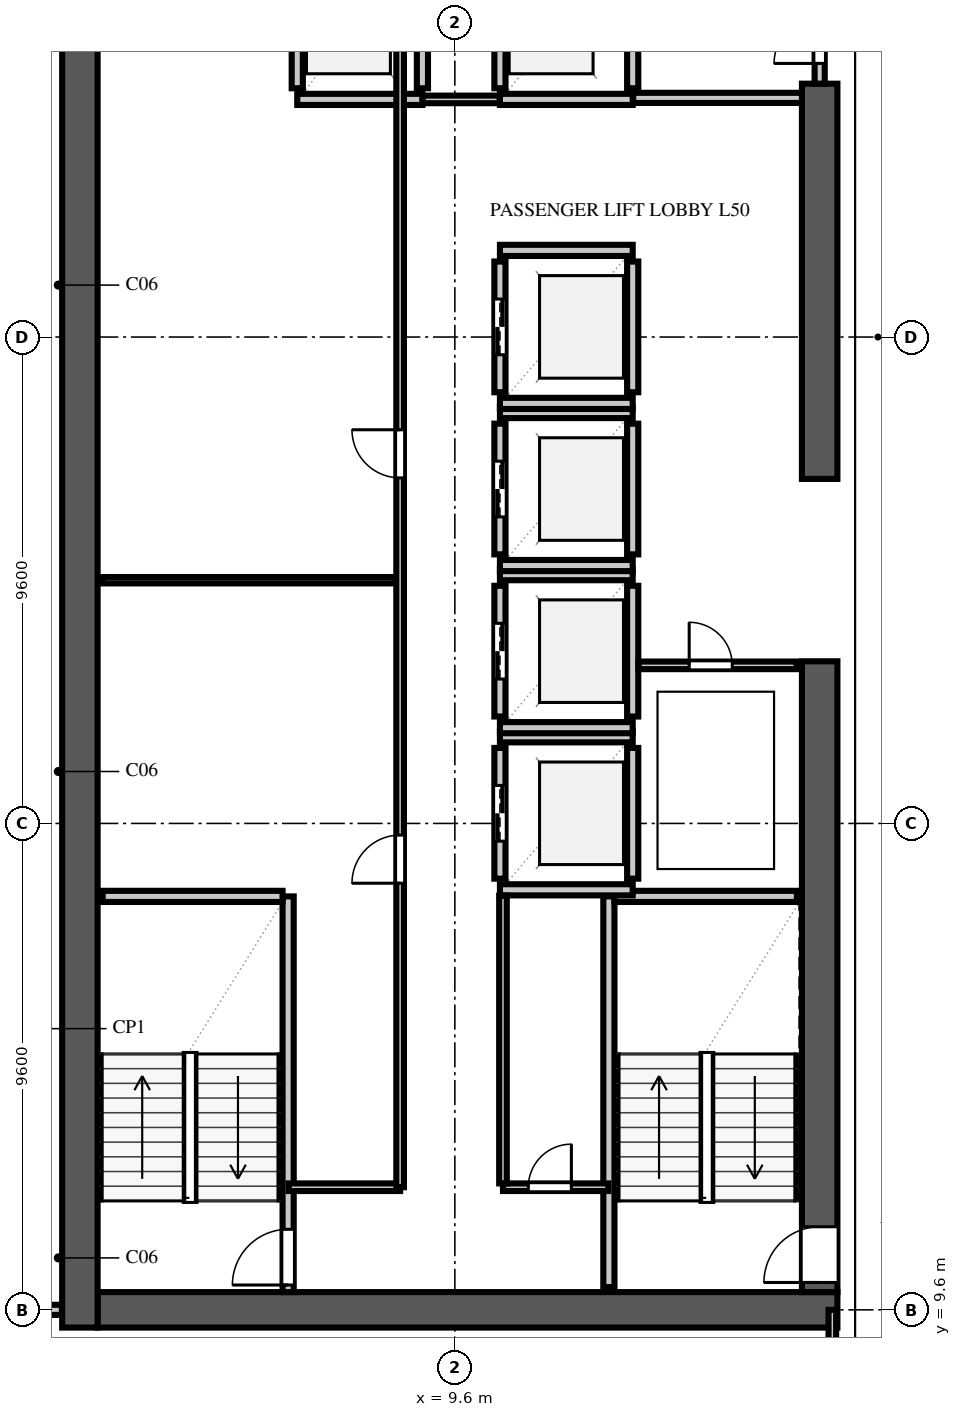
"""IFC4 building model, lengths in metres.
Left out: names, types, materials, properties, quantities, classifications, styles, units other than length and angle.
Written with IfcOpenShell. Run it as: python <this file> out.ifc"""

import sys

from ifc_helpers import new_model, si_unit, direction, frame, frame_2d, origin, place, context, subcontext, project, spatial, rectangle, extrude, element, fill, save


model = new_model("IFC4")
c1 = context("Model", 3, precision=1e-05, world=origin(), true_north=direction((0.0, 1.0)))
c2 = subcontext(c1, "Body", "Model", "MODEL_VIEW")
j1 = project(units=[si_unit("LENGTHUNIT", "METRE"), si_unit("PLANEANGLEUNIT", "RADIAN")], contexts=[c1])
p1 = place(None, origin())
s1 = spatial("IfcSite", under=j1, at=p1, CompositionType="ELEMENT")
p2 = place(p1, origin())
s2 = spatial("IfcBuilding", under=s1, at=p2, CompositionType="ELEMENT")
p3 = place(p2, frame((0.0, 0.0, 199.0)))
s3 = spatial("IfcBuildingStorey", under=s2, at=p3, CompositionType="ELEMENT", Elevation=199.0)
p4 = place(p3, frame((2.55, 9.6, 0.0), z_axis=(0.0, 0.0, 1.0), x_axis=(1.0, 0.0, 0.0)))
e1 = element("IfcWall", 1, at=p4, inside=s3, PredefinedType="SHEAR", context=c2, shape_type="SweptSolid", body=[
    extrude(rectangle(XDim=14.6, YDim=0.7, at=frame_2d((7.3, 0.0))), origin(), (0.0, 0.0, 1.0), 3.54),
])
p5 = place(p3, frame((2.2, 9.25, 0.0), z_axis=(0.0, 0.0, 1.0), x_axis=(0.0, 1.0, 0.0)))
e2 = element("IfcWall", 2, at=p5, inside=s3, PredefinedType="SHEAR", context=c2, shape_type="SweptSolid", body=[
    extrude(rectangle(XDim=39.1, YDim=0.7, at=frame_2d((19.55, 0.0))), origin(), (0.0, 0.0, 1.0), 3.54),
])
p6 = place(p3, frame((16.8, 9.95, 0.0), z_axis=(0.0, 0.0, 1.0), x_axis=(0.0, 1.0, 0.0)))
e3 = element("IfcWall", 3, at=p6, inside=s3, PredefinedType="SHEAR", context=c2, shape_type="SweptSolid", body=[
    extrude(rectangle(XDim=12.45, YDim=0.7, at=frame_2d((6.225, 0.0))), origin(), (0.0, 0.0, 1.0), 3.54),
])
p7 = place(p6, frame((0.19, 0.0, 0.0)))
e4 = element("IfcOpeningElement", 4, at=p7, cuts=e3, PredefinedType="OPENING", context=c2, shape_type="SweptSolid", body=[
    extrude(rectangle(XDim=1.1, YDim=2.2, at=frame_2d((0.55, 1.1))), frame((0.0, 0.362, 0.0), z_axis=(0.0, -1.0, 0.0), x_axis=(1.0, 0.0, 0.0)), (0.0, 0.0, 1.0), 0.724),
])
p8 = place(p3, frame((16.8, 26.0, 0.0), z_axis=(0.0, 0.0, 1.0), x_axis=(0.0, 1.0, 0.0)))
e5 = element("IfcWall", 5, at=p8, inside=s3, PredefinedType="SHEAR", context=c2, shape_type="SweptSolid", body=[
    extrude(rectangle(XDim=7.8, YDim=0.7, at=frame_2d((3.9, 0.0))), origin(), (0.0, 0.0, 1.0), 3.54),
])
p9 = place(p3, frame((6.31, 9.95, 0.0), z_axis=(0.0, 0.0, 1.0), x_axis=(0.0, 1.0, 0.0)))
e6 = element("IfcWall", 6, at=p9, inside=s3, PredefinedType="SOLIDWALL", context=c2, shape_type="SweptSolid", body=[
    extrude(rectangle(XDim=7.81, YDim=0.22, at=frame_2d((3.905, 0.0))), origin(), (0.0, 0.0, 1.0), 3.54),
])
p10 = place(p9, frame((0.14, 0.0, 0.0)))
e7 = element("IfcOpeningElement", 7, at=p10, cuts=e6, PredefinedType="OPENING", context=c2, shape_type="SweptSolid", body=[
    extrude(rectangle(XDim=1.1, YDim=2.2, at=frame_2d((0.55, 1.1))), frame((0.0, 0.122, 0.0), z_axis=(0.0, -1.0, 0.0), x_axis=(1.0, 0.0, 0.0)), (0.0, 0.0, 1.0), 0.244),
])
p11 = place(p3, frame((2.65, 17.76, 0.0), z_axis=(0.0, 0.0, 1.0), x_axis=(1.0, 0.0, 0.0)))
e8 = element("IfcWall", 8, at=p11, inside=s3, PredefinedType="SOLIDWALL", context=c2, shape_type="SweptSolid", body=[
    extrude(rectangle(XDim=3.55, YDim=0.22, at=frame_2d((1.775, 0.0))), origin(), (0.0, 0.0, 1.0), 3.54),
])
p12 = place(p3, frame((12.64, 10.05, 0.0), z_axis=(0.0, 0.0, 1.0), x_axis=(0.0, 1.0, 0.0)))
e9 = element("IfcWall", 9, at=p12, inside=s3, PredefinedType="SOLIDWALL", context=c2, shape_type="SweptSolid", body=[
    extrude(rectangle(XDim=7.71, YDim=0.22, at=frame_2d((3.855, 0.0))), origin(), (0.0, 0.0, 1.0), 3.54),
])
p13 = place(p3, frame((12.75, 17.76, 0.0), z_axis=(0.0, 0.0, 1.0), x_axis=(1.0, 0.0, 0.0)))
e10 = element("IfcWall", 10, at=p13, inside=s3, PredefinedType="SOLIDWALL", context=c2, shape_type="SweptSolid", body=[
    extrude(rectangle(XDim=3.6, YDim=0.22, at=frame_2d((1.8, 0.0))), origin(), (0.0, 0.0, 1.0), 3.54),
])
p14 = place(p3, frame((10.49, 18.11, 0.0), z_axis=(0.0, 0.0, 1.0), x_axis=(0.0, 1.0, 0.0)))
e11 = element("IfcWall", 11, at=p14, inside=s3, PredefinedType="SOLIDWALL", context=c2, shape_type="SweptSolid", body=[
    extrude(rectangle(XDim=2.58, YDim=0.22, at=frame_2d((1.29, 0.0))), origin(), (0.0, 0.0, 1.0), 3.54),
])
p15 = place(p14, frame((0.74, 0.0, 0.0)))
e12 = element("IfcOpeningElement", 12, at=p15, cuts=e11, PredefinedType="OPENING", context=c2, shape_type="SweptSolid", body=[
    extrude(rectangle(XDim=1.1, YDim=2.2, at=frame_2d((0.55, 1.1))), frame((0.0, 0.122, 0.0), z_axis=(0.0, -1.0, 0.0), x_axis=(1.0, 0.0, 0.0)), (0.0, 0.0, 1.0), 0.244),
])
p16 = place(p3, frame((13.11, 18.11, 0.0), z_axis=(0.0, 0.0, 1.0), x_axis=(0.0, 1.0, 0.0)))
e13 = element("IfcWall", 13, at=p16, inside=s3, PredefinedType="SOLIDWALL", context=c2, shape_type="SweptSolid", body=[
    extrude(rectangle(XDim=2.58, YDim=0.22, at=frame_2d((1.29, 0.0))), origin(), (0.0, 0.0, 1.0), 3.54),
])
for number, where, z_axis, x_axis in (
    (14, (10.49, 17.89, 0.0), (0.0, 0.0, 1.0), (1.0, 0.0, 0.0)),
    (15, (10.49, 20.91, 0.0), (0.0, 0.0, 1.0), (1.0, 0.0, 0.0)),
):
    element("IfcWall", number, at=place(p3, frame(where, z_axis=z_axis, x_axis=x_axis)), inside=s3, PredefinedType="SOLIDWALL", context=c2, shape_type="SweptSolid", body=[
        extrude(rectangle(XDim=2.62, YDim=0.22, at=frame_2d((1.31, 0.0))), origin(), (0.0, 0.0, 1.0), 3.54),
    ])
p17 = place(p3, frame((10.49, 21.31, 0.0), z_axis=(0.0, 0.0, 1.0), x_axis=(0.0, 1.0, 0.0)))
e16 = element("IfcWall", 16, at=p17, inside=s3, PredefinedType="SOLIDWALL", context=c2, shape_type="SweptSolid", body=[
    extrude(rectangle(XDim=2.58, YDim=0.22, at=frame_2d((1.29, 0.0))), origin(), (0.0, 0.0, 1.0), 3.54),
])
p18 = place(p17, frame((0.74, 0.0, 0.0)))
e17 = element("IfcOpeningElement", 17, at=p18, cuts=e16, PredefinedType="OPENING", context=c2, shape_type="SweptSolid", body=[
    extrude(rectangle(XDim=1.1, YDim=2.2, at=frame_2d((0.55, 1.1))), frame((0.0, 0.122, 0.0), z_axis=(0.0, -1.0, 0.0), x_axis=(1.0, 0.0, 0.0)), (0.0, 0.0, 1.0), 0.244),
])
p19 = place(p3, frame((13.11, 21.31, 0.0), z_axis=(0.0, 0.0, 1.0), x_axis=(0.0, 1.0, 0.0)))
e18 = element("IfcWall", 18, at=p19, inside=s3, PredefinedType="SOLIDWALL", context=c2, shape_type="SweptSolid", body=[
    extrude(rectangle(XDim=2.58, YDim=0.22, at=frame_2d((1.29, 0.0))), origin(), (0.0, 0.0, 1.0), 3.54),
])
for number, where, z_axis, x_axis in (
    (19, (10.49, 21.09, 0.0), (0.0, 0.0, 1.0), (1.0, 0.0, 0.0)),
    (20, (10.49, 24.11, 0.0), (0.0, 0.0, 1.0), (1.0, 0.0, 0.0)),
):
    element("IfcWall", number, at=place(p3, frame(where, z_axis=z_axis, x_axis=x_axis)), inside=s3, PredefinedType="SOLIDWALL", context=c2, shape_type="SweptSolid", body=[
        extrude(rectangle(XDim=2.62, YDim=0.22, at=frame_2d((1.31, 0.0))), origin(), (0.0, 0.0, 1.0), 3.54),
    ])
p20 = place(p3, frame((10.49, 24.51, 0.0), z_axis=(0.0, 0.0, 1.0), x_axis=(0.0, 1.0, 0.0)))
e21 = element("IfcWall", 21, at=p20, inside=s3, PredefinedType="SOLIDWALL", context=c2, shape_type="SweptSolid", body=[
    extrude(rectangle(XDim=2.58, YDim=0.22, at=frame_2d((1.29, 0.0))), origin(), (0.0, 0.0, 1.0), 3.54),
])
p21 = place(p20, frame((0.74, 0.0, 0.0)))
e22 = element("IfcOpeningElement", 22, at=p21, cuts=e21, PredefinedType="OPENING", context=c2, shape_type="SweptSolid", body=[
    extrude(rectangle(XDim=1.1, YDim=2.2, at=frame_2d((0.55, 1.1))), frame((0.0, 0.122, 0.0), z_axis=(0.0, -1.0, 0.0), x_axis=(1.0, 0.0, 0.0)), (0.0, 0.0, 1.0), 0.244),
])
p22 = place(p3, frame((13.11, 24.51, 0.0), z_axis=(0.0, 0.0, 1.0), x_axis=(0.0, 1.0, 0.0)))
e23 = element("IfcWall", 23, at=p22, inside=s3, PredefinedType="SOLIDWALL", context=c2, shape_type="SweptSolid", body=[
    extrude(rectangle(XDim=2.58, YDim=0.22, at=frame_2d((1.29, 0.0))), origin(), (0.0, 0.0, 1.0), 3.54),
])
for number, where, z_axis, x_axis in (
    (24, (10.49, 24.29, 0.0), (0.0, 0.0, 1.0), (1.0, 0.0, 0.0)),
    (25, (10.49, 27.31, 0.0), (0.0, 0.0, 1.0), (1.0, 0.0, 0.0)),
):
    element("IfcWall", number, at=place(p3, frame(where, z_axis=z_axis, x_axis=x_axis)), inside=s3, PredefinedType="SOLIDWALL", context=c2, shape_type="SweptSolid", body=[
        extrude(rectangle(XDim=2.62, YDim=0.22, at=frame_2d((1.31, 0.0))), origin(), (0.0, 0.0, 1.0), 3.54),
    ])
p23 = place(p3, frame((10.49, 27.71, 0.0), z_axis=(0.0, 0.0, 1.0), x_axis=(0.0, 1.0, 0.0)))
e26 = element("IfcWall", 26, at=p23, inside=s3, PredefinedType="SOLIDWALL", context=c2, shape_type="SweptSolid", body=[
    extrude(rectangle(XDim=2.58, YDim=0.22, at=frame_2d((1.29, 0.0))), origin(), (0.0, 0.0, 1.0), 3.54),
])
p24 = place(p23, frame((0.74, 0.0, 0.0)))
e27 = element("IfcOpeningElement", 27, at=p24, cuts=e26, PredefinedType="OPENING", context=c2, shape_type="SweptSolid", body=[
    extrude(rectangle(XDim=1.1, YDim=2.2, at=frame_2d((0.55, 1.1))), frame((0.0, 0.122, 0.0), z_axis=(0.0, -1.0, 0.0), x_axis=(1.0, 0.0, 0.0)), (0.0, 0.0, 1.0), 0.244),
])
p25 = place(p3, frame((13.11, 27.71, 0.0), z_axis=(0.0, 0.0, 1.0), x_axis=(0.0, 1.0, 0.0)))
e28 = element("IfcWall", 28, at=p25, inside=s3, PredefinedType="SOLIDWALL", context=c2, shape_type="SweptSolid", body=[
    extrude(rectangle(XDim=2.58, YDim=0.22, at=frame_2d((1.29, 0.0))), origin(), (0.0, 0.0, 1.0), 3.54),
])
for number, where, z_axis, x_axis in (
    (29, (10.49, 27.49, 0.0), (0.0, 0.0, 1.0), (1.0, 0.0, 0.0)),
    (30, (10.49, 30.51, 0.0), (0.0, 0.0, 1.0), (1.0, 0.0, 0.0)),
):
    element("IfcWall", number, at=place(p3, frame(where, z_axis=z_axis, x_axis=x_axis)), inside=s3, PredefinedType="SOLIDWALL", context=c2, shape_type="SweptSolid", body=[
        extrude(rectangle(XDim=2.62, YDim=0.22, at=frame_2d((1.31, 0.0))), origin(), (0.0, 0.0, 1.0), 3.54),
    ])
for number, where, z_axis, x_axis in (
    (31, (6.49, 33.71, 0.0), (0.0, 0.0, 1.0), (0.0, 1.0, 0.0)),
    (32, (8.96, 33.71, 0.0), (0.0, 0.0, 1.0), (0.0, 1.0, 0.0)),
):
    element("IfcWall", number, at=place(p3, frame(where, z_axis=z_axis, x_axis=x_axis)), inside=s3, PredefinedType="SOLIDWALL", context=c2, shape_type="SweptSolid", body=[
        extrude(rectangle(XDim=2.78, YDim=0.22, at=frame_2d((1.39, 0.0))), origin(), (0.0, 0.0, 1.0), 3.54),
    ])
p26 = place(p3, frame((6.49, 33.49, 0.0), z_axis=(0.0, 0.0, 1.0), x_axis=(1.0, 0.0, 0.0)))
e33 = element("IfcWall", 33, at=p26, inside=s3, PredefinedType="SOLIDWALL", context=c2, shape_type="SweptSolid", body=[
    extrude(rectangle(XDim=2.47, YDim=0.22, at=frame_2d((1.235, 0.0))), origin(), (0.0, 0.0, 1.0), 3.54),
])
for number, where, z_axis, x_axis in (
    (34, (10.49, 33.71, 0.0), (0.0, 0.0, 1.0), (0.0, 1.0, 0.0)),
    (35, (13.11, 33.71, 0.0), (0.0, 0.0, 1.0), (0.0, 1.0, 0.0)),
):
    element("IfcWall", number, at=place(p3, frame(where, z_axis=z_axis, x_axis=x_axis)), inside=s3, PredefinedType="SOLIDWALL", context=c2, shape_type="SweptSolid", body=[
        extrude(rectangle(XDim=2.78, YDim=0.22, at=frame_2d((1.39, 0.0))), origin(), (0.0, 0.0, 1.0), 3.54),
    ])
p27 = place(p3, frame((10.49, 33.49, 0.0), z_axis=(0.0, 0.0, 1.0), x_axis=(1.0, 0.0, 0.0)))
e36 = element("IfcWall", 36, at=p27, inside=s3, PredefinedType="SOLIDWALL", context=c2, shape_type="SweptSolid", body=[
    extrude(rectangle(XDim=2.62, YDim=0.22, at=frame_2d((1.31, 0.0))), origin(), (0.0, 0.0, 1.0), 3.54),
])
p28 = place(p3, frame((13.12, 33.52, 0.0), z_axis=(0.0, 0.0, 1.0), x_axis=(1.0, 0.0, 0.0)))
e37 = element("IfcWall", 37, at=p28, inside=s3, PredefinedType="SOLIDWALL", context=c2, shape_type="SweptSolid", body=[
    extrude(rectangle(XDim=3.33, YDim=0.2, at=frame_2d((1.665, 0.0))), origin(), (0.0, 0.0, 1.0), 3.54),
])
p29 = place(p3, frame((16.8, 33.8, 0.0), z_axis=(0.0, 0.0, 1.0), x_axis=(0.0, 1.0, 0.0)))
e38 = element("IfcWall", 38, at=p29, inside=s3, PredefinedType="SOLIDWALL", context=c2, shape_type="SweptSolid", body=[
    extrude(rectangle(XDim=2.6, YDim=0.2, at=frame_2d((1.3, 0.0))), origin(), (0.0, 0.0, 1.0), 3.54),
])
p30 = place(p29, frame((0.4, 0.0, 0.0)))
e39 = element("IfcOpeningElement", 39, at=p30, cuts=e38, PredefinedType="OPENING", context=c2, shape_type="SweptSolid", body=[
    extrude(rectangle(XDim=1.8, YDim=2.2, at=frame_2d((0.9, 1.1))), frame((0.0, 0.112, 0.0), z_axis=(0.0, -1.0, 0.0), x_axis=(1.0, 0.0, 0.0)), (0.0, 0.0, 1.0), 0.224),
])
p31 = place(p3, frame((8.965, 33.49, 0.0), z_axis=(0.0, 0.0, 1.0), x_axis=(1.0, 0.0, 0.0)))
e40 = element("IfcWall", 40, at=p31, inside=s3, PredefinedType="PARTITIONING", context=c2, shape_type="SweptSolid", body=[
    extrude(rectangle(XDim=1.52, YDim=0.15, at=frame_2d((0.76, 0.0))), origin(), (0.0, 0.0, 1.0), 3.54),
])
p32 = place(p3, frame((10.55, 12.02, 0.0), z_axis=(0.0, 0.0, 1.0), x_axis=(1.0, 0.0, 0.0)))
e41 = element("IfcWall", 41, at=p32, inside=s3, PredefinedType="PARTITIONING", context=c2, shape_type="SweptSolid", body=[
    extrude(rectangle(XDim=2.08, YDim=0.15, at=frame_2d((1.04, 0.0))), origin(), (0.0, 0.0, 1.0), 3.54),
])
p33 = place(p32, frame((0.5, 0.0, 0.0)))
e42 = element("IfcOpeningElement", 42, at=p33, cuts=e41, PredefinedType="OPENING", context=c2, shape_type="SweptSolid", body=[
    extrude(rectangle(XDim=0.85, YDim=2.1, at=frame_2d((0.425, 1.05))), frame((0.0, 0.087, 0.0), z_axis=(0.0, -1.0, 0.0), x_axis=(1.0, 0.0, 0.0)), (0.0, 0.0, 1.0), 0.174),
])
p34 = place(p3, frame((10.55, 12.095, 0.0), z_axis=(0.0, 0.0, 1.0), x_axis=(0.0, 1.0, 0.0)))
e43 = element("IfcWall", 43, at=p34, inside=s3, PredefinedType="PARTITIONING", context=c2, shape_type="SweptSolid", body=[
    extrude(rectangle(XDim=5.68, YDim=0.15, at=frame_2d((2.84, 0.0))), origin(), (0.0, 0.0, 1.0), 3.54),
])
p35 = place(p3, frame((13.225, 22.32, 0.0), z_axis=(0.0, 0.0, 1.0), x_axis=(1.0, 0.0, 0.0)))
e44 = element("IfcWall", 44, at=p35, inside=s3, PredefinedType="PARTITIONING", context=c2, shape_type="SweptSolid", body=[
    extrude(rectangle(XDim=3.12, YDim=0.15, at=frame_2d((1.56, 0.0))), origin(), (0.0, 0.0, 1.0), 3.54),
])
p36 = place(p35, frame((1.0, 0.0, 0.0)))
e45 = element("IfcOpeningElement", 45, at=p36, cuts=e44, PredefinedType="OPENING", context=c2, shape_type="SweptSolid", body=[
    extrude(rectangle(XDim=0.85, YDim=2.1, at=frame_2d((0.425, 1.05))), frame((0.0, 0.087, 0.0), z_axis=(0.0, -1.0, 0.0), x_axis=(1.0, 0.0, 0.0)), (0.0, 0.0, 1.0), 0.174),
])
p37 = place(p3, frame((6.32, 12.02, 0.0), z_axis=(0.0, 0.0, 1.0), x_axis=(1.0, 0.0, 0.0)))
e46 = element("IfcWall", 46, at=p37, inside=s3, PredefinedType="PARTITIONING", context=c2, shape_type="SweptSolid", body=[
    extrude(rectangle(XDim=2.2, YDim=0.15, at=frame_2d((1.1, 0.0))), origin(), (0.0, 0.0, 1.0), 3.54),
])
p38 = place(p3, frame((2.65, 24.0, 0.0), z_axis=(0.0, 0.0, 1.0), x_axis=(1.0, 0.0, 0.0)))
e47 = element("IfcWall", 47, at=p38, inside=s3, PredefinedType="PARTITIONING", context=c2, shape_type="SweptSolid", body=[
    extrude(rectangle(XDim=5.87, YDim=0.125, at=frame_2d((2.935, 0.0))), origin(), (0.0, 0.0, 1.0), 3.54),
])
p39 = place(p3, frame((8.52, 12.02, 0.0), z_axis=(0.0, 0.0, 1.0), x_axis=(0.0, 1.0, 0.0)))
e48 = element("IfcWall", 48, at=p39, inside=s3, PredefinedType="PARTITIONING", context=c2, shape_type="SweptSolid", body=[
    extrude(rectangle(XDim=24.76, YDim=0.15, at=frame_2d((12.38, 0.0))), origin(), (0.0, 0.0, 1.0), 3.54),
])
p40 = place(p39, frame((6.0, 0.0, 0.0)))
e49 = element("IfcOpeningElement", 49, at=p40, cuts=e48, PredefinedType="OPENING", context=c2, shape_type="SweptSolid", body=[
    extrude(rectangle(XDim=0.95, YDim=2.15, at=frame_2d((0.475, 1.075))), frame((0.0, 0.087, 0.0), z_axis=(0.0, -1.0, 0.0), x_axis=(1.0, 0.0, 0.0)), (0.0, 0.0, 1.0), 0.174),
])
p41 = place(p39, frame((14.0, 0.0, 0.0)))
e50 = element("IfcOpeningElement", 50, at=p41, cuts=e48, PredefinedType="OPENING", context=c2, shape_type="SweptSolid", body=[
    extrude(rectangle(XDim=0.95, YDim=2.15, at=frame_2d((0.475, 1.075))), frame((0.0, 0.087, 0.0), z_axis=(0.0, -1.0, 0.0), x_axis=(1.0, 0.0, 0.0)), (0.0, 0.0, 1.0), 0.174),
])
p42 = place(p3, frame((0.85, 9.6, 0.0), z_axis=(0.0, 0.0, 1.0), x_axis=(1.0, 0.0, 0.0)))
e51 = element("IfcWall", 51, at=p42, inside=s3, PredefinedType="SOLIDWALL", context=c2, shape_type="SweptSolid", body=[
    extrude(rectangle(XDim=0.995, YDim=0.2, at=frame_2d((0.498, 0.0))), origin(), (0.0, 0.0, 1.0), 2.996),
])
p43 = place(p3, frame((17.05, 0.22, 0.0), z_axis=(0.0, 0.0, 1.0), x_axis=(0.0, 1.0, 0.0)))
e52 = element("IfcWall", 52, at=p43, inside=s3, PredefinedType="PARTITIONING", context=c2, shape_type="SweptSolid", body=[
    extrude(rectangle(XDim=9.38, YDim=0.15, at=frame_2d((4.69, 0.0))), origin(), (0.0, 0.0, 1.0), 3.54),
])
p44 = place(p43, frame((5.58, 0.0, 0.0)))
e53 = element("IfcOpeningElement", 53, at=p44, cuts=e52, PredefinedType="OPENING", context=c2, shape_type="SweptSolid", body=[
    extrude(rectangle(XDim=0.95, YDim=2.15, at=frame_2d((0.475, 1.075))), frame((0.0, 0.087, 0.0), z_axis=(0.0, -1.0, 0.0), x_axis=(1.0, 0.0, 0.0)), (0.0, 0.0, 1.0), 0.174),
])
p45 = place(p10, origin())
e54 = element("IfcDoor", 54, at=p45, inside=s3, OperationType="SINGLE_SWING_LEFT", PredefinedType="DOOR", context=c2, shape_type="SweptSolid", body=[
    extrude(rectangle(XDim=1.1, YDim=2.2, at=frame_2d((0.55, 1.1))), frame((0.0, 0.025, 0.0), z_axis=(0.0, -1.0, 0.0), x_axis=(1.0, 0.0, 0.0)), (0.0, 0.0, 1.0), 0.05),
])
fill(e7, e54)
p46 = place(p7, origin())
e55 = element("IfcDoor", 55, at=p46, inside=s3, OperationType="SINGLE_SWING_LEFT", PredefinedType="DOOR", context=c2, shape_type="SweptSolid", body=[
    extrude(rectangle(XDim=1.1, YDim=2.2, at=frame_2d((0.55, 1.1))), frame((0.0, 0.025, 0.0), z_axis=(0.0, -1.0, 0.0), x_axis=(1.0, 0.0, 0.0)), (0.0, 0.0, 1.0), 0.05),
])
fill(e4, e55)
p47 = place(p15, origin())
e56 = element("IfcDoor", 56, at=p47, inside=s3, OperationType="DOUBLE_DOOR_SLIDING", PredefinedType="DOOR", context=c2, shape_type="SweptSolid", body=[
    extrude(rectangle(XDim=1.1, YDim=2.2, at=frame_2d((0.55, 1.1))), frame((0.0, 0.025, 0.0), z_axis=(0.0, -1.0, 0.0), x_axis=(1.0, 0.0, 0.0)), (0.0, 0.0, 1.0), 0.05),
])
fill(e12, e56)
p48 = place(p18, origin())
e57 = element("IfcDoor", 57, at=p48, inside=s3, OperationType="DOUBLE_DOOR_SLIDING", PredefinedType="DOOR", context=c2, shape_type="SweptSolid", body=[
    extrude(rectangle(XDim=1.1, YDim=2.2, at=frame_2d((0.55, 1.1))), frame((0.0, 0.025, 0.0), z_axis=(0.0, -1.0, 0.0), x_axis=(1.0, 0.0, 0.0)), (0.0, 0.0, 1.0), 0.05),
])
fill(e17, e57)
p49 = place(p21, origin())
e58 = element("IfcDoor", 58, at=p49, inside=s3, OperationType="DOUBLE_DOOR_SLIDING", PredefinedType="DOOR", context=c2, shape_type="SweptSolid", body=[
    extrude(rectangle(XDim=1.1, YDim=2.2, at=frame_2d((0.55, 1.1))), frame((0.0, 0.025, 0.0), z_axis=(0.0, -1.0, 0.0), x_axis=(1.0, 0.0, 0.0)), (0.0, 0.0, 1.0), 0.05),
])
fill(e22, e58)
p50 = place(p24, origin())
e59 = element("IfcDoor", 59, at=p50, inside=s3, OperationType="DOUBLE_DOOR_SLIDING", PredefinedType="DOOR", context=c2, shape_type="SweptSolid", body=[
    extrude(rectangle(XDim=1.1, YDim=2.2, at=frame_2d((0.55, 1.1))), frame((0.0, 0.025, 0.0), z_axis=(0.0, -1.0, 0.0), x_axis=(1.0, 0.0, 0.0)), (0.0, 0.0, 1.0), 0.05),
])
fill(e27, e59)
p51 = place(p30, origin())
e60 = element("IfcDoor", 60, at=p51, inside=s3, OperationType="DOUBLE_DOOR_SINGLE_SWING", PredefinedType="DOOR", context=c2, shape_type="SweptSolid", body=[
    extrude(rectangle(XDim=1.8, YDim=2.2, at=frame_2d((0.9, 1.1))), frame((0.0, 0.025, 0.0), z_axis=(0.0, -1.0, 0.0), x_axis=(1.0, 0.0, 0.0)), (0.0, 0.0, 1.0), 0.05),
])
fill(e39, e60)
p52 = place(p33, origin())
e61 = element("IfcDoor", 61, at=p52, inside=s3, OperationType="SINGLE_SWING_RIGHT", PredefinedType="DOOR", context=c2, shape_type="SweptSolid", body=[
    extrude(rectangle(XDim=0.85, YDim=2.1, at=frame_2d((0.425, 1.05))), frame((0.0, 0.025, 0.0), z_axis=(0.0, -1.0, 0.0), x_axis=(1.0, 0.0, 0.0)), (0.0, 0.0, 1.0), 0.05),
])
fill(e42, e61)
p53 = place(p36, origin())
e62 = element("IfcDoor", 62, at=p53, inside=s3, OperationType="SINGLE_SWING_LEFT", PredefinedType="DOOR", context=c2, shape_type="SweptSolid", body=[
    extrude(rectangle(XDim=0.85, YDim=2.1, at=frame_2d((0.425, 1.05))), frame((0.0, 0.025, 0.0), z_axis=(0.0, -1.0, 0.0), x_axis=(1.0, 0.0, 0.0)), (0.0, 0.0, 1.0), 0.05),
])
fill(e45, e62)
p54 = place(p40, origin())
e63 = element("IfcDoor", 63, at=p54, inside=s3, OperationType="SINGLE_SWING_LEFT", PredefinedType="DOOR", context=c2, shape_type="SweptSolid", body=[
    extrude(rectangle(XDim=0.95, YDim=2.15, at=frame_2d((0.475, 1.075))), frame((0.0, 0.025, 0.0), z_axis=(0.0, -1.0, 0.0), x_axis=(1.0, 0.0, 0.0)), (0.0, 0.0, 1.0), 0.05),
])
fill(e49, e63)
p55 = place(p41, origin())
e64 = element("IfcDoor", 64, at=p55, inside=s3, OperationType="SINGLE_SWING_RIGHT", PredefinedType="DOOR", context=c2, shape_type="SweptSolid", body=[
    extrude(rectangle(XDim=0.95, YDim=2.15, at=frame_2d((0.475, 1.075))), frame((0.0, 0.025, 0.0), z_axis=(0.0, -1.0, 0.0), x_axis=(1.0, 0.0, 0.0)), (0.0, 0.0, 1.0), 0.05),
])
fill(e50, e64)
save(model, sys.argv[1])
